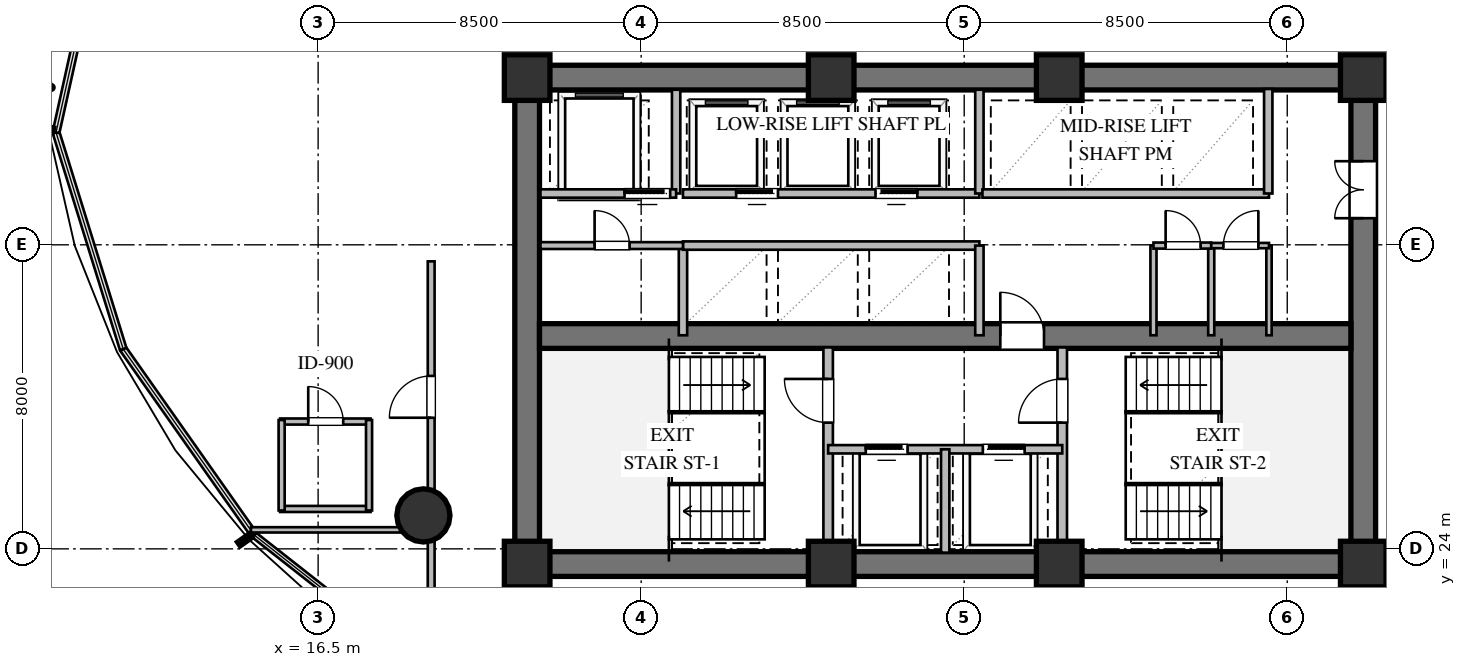
"""IFC4 building model, lengths in metres.
Left out: names, types, materials, properties, quantities, classifications, styles, units other than length and angle.
Written with IfcOpenShell. Run it as: python <this file> out.ifc"""

import sys

from ifc_helpers import new_model, si_unit, direction, frame, frame_2d, origin, origin_2d, place, context, subcontext, project, spatial, rectangle, circle, extrude, element, fill, save


model = new_model("IFC4")
c1 = context("Model", 3, precision=1e-05, world=origin(), true_north=direction((0.0, 1.0)))
c2 = subcontext(c1, "Body", "Model", "MODEL_VIEW")
j1 = project(units=[si_unit("LENGTHUNIT", "METRE"), si_unit("PLANEANGLEUNIT", "RADIAN")], contexts=[c1])
p1 = place(None, origin())
s1 = spatial("IfcSite", under=j1, at=p1, CompositionType="ELEMENT")
p2 = place(p1, origin())
s2 = spatial("IfcBuilding", under=s1, at=p2, CompositionType="ELEMENT")
p3 = place(p2, frame((0.0, 0.0, 52.8)))
s3 = spatial("IfcBuildingStorey", under=s2, at=p3, CompositionType="ELEMENT", Elevation=52.8)
for number, where, z_axis, x_axis in (
    (1, (21.675, 23.6, 0.0), (0.0, 0.0, 1.0), (1.0, 0.0, 0.0)),
    (2, (21.675, 36.4, 0.0), (0.0, 0.0, 1.0), (1.0, 0.0, 0.0)),
):
    element("IfcWall", number, at=place(p3, frame(where, z_axis=z_axis, x_axis=x_axis)), inside=s3, PredefinedType="SHEAR", context=c2, shape_type="SweptSolid", body=[
        extrude(rectangle(XDim=22.65, YDim=0.65, at=frame_2d((11.325, 0.0))), origin(), (0.0, 0.0, 1.0), 3.36),
    ])
p4 = place(p3, frame((22.0, 23.925, 0.0), z_axis=(0.0, 0.0, 1.0), x_axis=(0.0, 1.0, 0.0)))
e3 = element("IfcWall", 3, at=p4, inside=s3, PredefinedType="SHEAR", context=c2, shape_type="SweptSolid", body=[
    extrude(rectangle(XDim=12.15, YDim=0.65, at=frame_2d((6.075, 0.0))), origin(), (0.0, 0.0, 1.0), 3.36),
])
p5 = place(p3, frame((44.0, 23.925, 0.0), z_axis=(0.0, 0.0, 1.0), x_axis=(0.0, 1.0, 0.0)))
e4 = element("IfcWall", 4, at=p5, inside=s3, PredefinedType="SHEAR", context=c2, shape_type="SweptSolid", body=[
    extrude(rectangle(XDim=12.15, YDim=0.65, at=frame_2d((6.075, 0.0))), origin(), (0.0, 0.0, 1.0), 3.36),
])
p6 = place(p5, frame((8.775, 0.0, 0.0)))
e5 = element("IfcOpeningElement", 5, at=p6, cuts=e4, PredefinedType="OPENING", context=c2, shape_type="SweptSolid", body=[
    extrude(rectangle(XDim=1.5, YDim=2.15, at=frame_2d((0.75, 1.075))), frame((0.0, 0.335, 0.0), z_axis=(0.0, -1.0, 0.0), x_axis=(1.0, 0.0, 0.0)), (0.0, 0.0, 1.0), 0.67),
])
p7 = place(p3, frame((22.325, 29.6, 0.0), z_axis=(0.0, 0.0, 1.0), x_axis=(1.0, 0.0, 0.0)))
e6 = element("IfcWall", 6, at=p7, inside=s3, PredefinedType="SHEAR", context=c2, shape_type="SweptSolid", body=[
    extrude(rectangle(XDim=21.35, YDim=0.65, at=frame_2d((10.675, 0.0))), origin(), (0.0, 0.0, 1.0), 3.36),
])
p8 = place(p7, frame((12.125, 0.0, 0.0)))
e7 = element("IfcOpeningElement", 7, at=p8, cuts=e6, PredefinedType="OPENING", context=c2, shape_type="SweptSolid", body=[
    extrude(rectangle(XDim=1.15, YDim=2.1, at=frame_2d((0.575, 1.05))), frame((0.0, 0.335, 0.0), z_axis=(0.0, -1.0, 0.0), x_axis=(1.0, 0.0, 0.0)), (0.0, 0.0, 1.0), 0.67),
])
for number, where, z_axis, x_axis in (
    (8, (22.0, 23.6, 0.0), (0.0, 0.0, 1.0), (1.0, 0.0, 0.0)),
    (9, (30.0, 23.6, 0.0), (0.0, 0.0, 1.0), (1.0, 0.0, 0.0)),
    (10, (36.0, 23.6, 0.0), (0.0, 0.0, 1.0), (1.0, 0.0, 0.0)),
    (11, (44.0, 23.6, 0.0), (0.0, 0.0, 1.0), (1.0, 0.0, 0.0)),
    (12, (44.0, 36.4, 0.0), (0.0, 0.0, 1.0), (1.0, 0.0, 0.0)),
    (13, (36.0, 36.4, 0.0), (0.0, 0.0, 1.0), (1.0, 0.0, 0.0)),
    (14, (30.0, 36.4, 0.0), (0.0, 0.0, 1.0), (1.0, 0.0, 0.0)),
    (15, (22.0, 36.4, 0.0), (0.0, 0.0, 1.0), (1.0, 0.0, 0.0)),
):
    element("IfcColumn", number, at=place(p3, frame(where, z_axis=z_axis, x_axis=x_axis)), inside=s3, PredefinedType="COLUMN", context=c2, shape_type="SweptSolid", body=[
        extrude(rectangle(XDim=1.2, YDim=1.2, at=origin_2d()), origin(), (0.0, 0.0, 1.0), 3.6),
    ])
p9 = place(p3, frame((19.27, 24.88, 0.0), z_axis=(0.0, 0.0, 1.0), x_axis=(1.0, 0.0, 0.0)))
e16 = element("IfcColumn", 16, at=p9, inside=s3, PredefinedType="COLUMN", context=c2, shape_type="SweptSolid", body=[
    extrude(circle(Radius=0.7, at=origin_2d()), origin(), (0.0, 0.0, 1.0), 3.6),
])
p10 = place(p3, frame((29.92, 23.9, 0.0), z_axis=(0.0, 0.0, 1.0), x_axis=(0.0, 1.0, 0.0)))
e17 = element("IfcWall", 17, at=p10, inside=s3, PredefinedType="SOLIDWALL", context=c2, shape_type="SweptSolid", body=[
    extrude(rectangle(XDim=5.4, YDim=0.25, at=frame_2d((2.7, 0.0))), origin(), (0.0, 0.0, 1.0), 3.36),
])
p11 = place(p10, frame((3.421, 0.0, 0.0)))
e18 = element("IfcOpeningElement", 18, at=p11, cuts=e17, PredefinedType="OPENING", context=c2, shape_type="SweptSolid", body=[
    extrude(rectangle(XDim=1.15, YDim=2.1, at=frame_2d((0.575, 1.05))), frame((0.0, 0.135, 0.0), z_axis=(0.0, -1.0, 0.0), x_axis=(1.0, 0.0, 0.0)), (0.0, 0.0, 1.0), 0.27),
])
p12 = place(p3, frame((36.08, 23.9, 0.0), z_axis=(0.0, 0.0, 1.0), x_axis=(0.0, 1.0, 0.0)))
e19 = element("IfcWall", 19, at=p12, inside=s3, PredefinedType="SOLIDWALL", context=c2, shape_type="SweptSolid", body=[
    extrude(rectangle(XDim=5.4, YDim=0.25, at=frame_2d((2.7, 0.0))), origin(), (0.0, 0.0, 1.0), 3.36),
])
p13 = place(p12, frame((3.421, 0.0, 0.0)))
e20 = element("IfcOpeningElement", 20, at=p13, cuts=e19, PredefinedType="OPENING", context=c2, shape_type="SweptSolid", body=[
    extrude(rectangle(XDim=1.15, YDim=2.1, at=frame_2d((0.575, 1.05))), frame((0.0, 0.135, 0.0), z_axis=(0.0, -1.0, 0.0), x_axis=(1.0, 0.0, 0.0)), (0.0, 0.0, 1.0), 0.27),
])
p14 = place(p3, frame((29.92, 26.62, 0.0), z_axis=(0.0, 0.0, 1.0), x_axis=(1.0, 0.0, 0.0)))
e21 = element("IfcWall", 21, at=p14, inside=s3, PredefinedType="SOLIDWALL", context=c2, shape_type="SweptSolid", body=[
    extrude(rectangle(XDim=6.16, YDim=0.22, at=frame_2d((3.08, 0.0))), origin(), (0.0, 0.0, 1.0), 3.36),
])
p15 = place(p14, frame((0.99, 0.0, 0.0)))
e22 = element("IfcOpeningElement", 22, at=p15, cuts=e21, PredefinedType="OPENING", context=c2, shape_type="SweptSolid", body=[
    extrude(rectangle(XDim=1.1, YDim=2.1, at=frame_2d((0.55, 1.05))), frame((0.0, 0.12, 0.0), z_axis=(0.0, -1.0, 0.0), x_axis=(1.0, 0.0, 0.0)), (0.0, 0.0, 1.0), 0.24),
])
p16 = place(p14, frame((4.07, 0.0, 0.0)))
e23 = element("IfcOpeningElement", 23, at=p16, cuts=e21, PredefinedType="OPENING", context=c2, shape_type="SweptSolid", body=[
    extrude(rectangle(XDim=1.1, YDim=2.1, at=frame_2d((0.55, 1.05))), frame((0.0, 0.12, 0.0), z_axis=(0.0, -1.0, 0.0), x_axis=(1.0, 0.0, 0.0)), (0.0, 0.0, 1.0), 0.24),
])
p17 = place(p3, frame((33.0, 23.9, 0.0), z_axis=(0.0, 0.0, 1.0), x_axis=(0.0, 1.0, 0.0)))
e24 = element("IfcWall", 24, at=p17, inside=s3, PredefinedType="SOLIDWALL", context=c2, shape_type="SweptSolid", body=[
    extrude(rectangle(XDim=2.72, YDim=0.22, at=frame_2d((1.36, 0.0))), origin(), (0.0, 0.0, 1.0), 3.36),
])
p18 = place(p3, frame((25.92, 33.35, 0.0), z_axis=(0.0, 0.0, 1.0), x_axis=(0.0, 1.0, 0.0)))
e25 = element("IfcWall", 25, at=p18, inside=s3, PredefinedType="SOLIDWALL", context=c2, shape_type="SweptSolid", body=[
    extrude(rectangle(XDim=2.73, YDim=0.22, at=frame_2d((1.365, 0.0))), origin(), (0.0, 0.0, 1.0), 3.36),
])
p19 = place(p3, frame((22.35, 33.35, 0.0), z_axis=(0.0, 0.0, 1.0), x_axis=(1.0, 0.0, 0.0)))
e26 = element("IfcWall", 26, at=p19, inside=s3, PredefinedType="SOLIDWALL", context=c2, shape_type="SweptSolid", body=[
    extrude(rectangle(XDim=3.57, YDim=0.22, at=frame_2d((1.785, 0.0))), origin(), (0.0, 0.0, 1.0), 3.36),
])
p20 = place(p19, frame((2.213, 0.0, 0.0)))
e27 = element("IfcOpeningElement", 27, at=p20, cuts=e26, PredefinedType="OPENING", context=c2, shape_type="SweptSolid", body=[
    extrude(rectangle(XDim=1.2, YDim=2.1, at=frame_2d((0.6, 1.05))), frame((0.0, 0.12, 0.0), z_axis=(0.0, -1.0, 0.0), x_axis=(1.0, 0.0, 0.0)), (0.0, 0.0, 1.0), 0.24),
])
p21 = place(p3, frame((26.1, 29.62, 0.0), z_axis=(0.0, 0.0, 1.0), x_axis=(0.0, 1.0, 0.0)))
e28 = element("IfcWall", 28, at=p21, inside=s3, PredefinedType="SOLIDWALL", context=c2, shape_type="SweptSolid", body=[
    extrude(rectangle(XDim=2.36, YDim=0.22, at=frame_2d((1.18, 0.0))), origin(), (0.0, 0.0, 1.0), 3.36),
])
p22 = place(p3, frame((26.1, 31.98, 0.0), z_axis=(0.0, 0.0, 1.0), x_axis=(1.0, 0.0, 0.0)))
e29 = element("IfcWall", 29, at=p22, inside=s3, PredefinedType="SOLIDWALL", context=c2, shape_type="SweptSolid", body=[
    extrude(rectangle(XDim=7.8, YDim=0.22, at=frame_2d((3.9, 0.0))), origin(), (0.0, 0.0, 1.0), 3.36),
])
p23 = place(p3, frame((33.9, 29.62, 0.0), z_axis=(0.0, 0.0, 1.0), x_axis=(0.0, 1.0, 0.0)))
e30 = element("IfcWall", 30, at=p23, inside=s3, PredefinedType="SOLIDWALL", context=c2, shape_type="SweptSolid", body=[
    extrude(rectangle(XDim=2.36, YDim=0.22, at=frame_2d((1.18, 0.0))), origin(), (0.0, 0.0, 1.0), 3.36),
])
p24 = place(p3, frame((26.1, 33.35, 0.0), z_axis=(0.0, 0.0, 1.0), x_axis=(1.0, 0.0, 0.0)))
e31 = element("IfcWall", 31, at=p24, inside=s3, PredefinedType="SOLIDWALL", context=c2, shape_type="SweptSolid", body=[
    extrude(rectangle(XDim=7.8, YDim=0.22, at=frame_2d((3.9, 0.0))), origin(), (0.0, 0.0, 1.0), 3.36),
])
p25 = place(p24, frame((1.4, 0.0, 0.0)))
e32 = element("IfcOpeningElement", 32, at=p25, cuts=e31, PredefinedType="OPENING", context=c2, shape_type="SweptSolid", body=[
    extrude(rectangle(XDim=1.1, YDim=2.1, at=frame_2d((0.55, 1.05))), frame((0.0, 0.12, 0.0), z_axis=(0.0, -1.0, 0.0), x_axis=(1.0, 0.0, 0.0)), (0.0, 0.0, 1.0), 0.24),
])
p26 = place(p24, frame((5.066, 0.0, 0.0)))
e33 = element("IfcOpeningElement", 33, at=p26, cuts=e31, PredefinedType="OPENING", context=c2, shape_type="SweptSolid", body=[
    extrude(rectangle(XDim=1.1, YDim=2.1, at=frame_2d((0.55, 1.05))), frame((0.0, 0.12, 0.0), z_axis=(0.0, -1.0, 0.0), x_axis=(1.0, 0.0, 0.0)), (0.0, 0.0, 1.0), 0.24),
])
p27 = place(p3, frame((33.9, 33.35, 0.0), z_axis=(0.0, 0.0, 1.0), x_axis=(0.0, 1.0, 0.0)))
e34 = element("IfcWall", 34, at=p27, inside=s3, PredefinedType="SOLIDWALL", context=c2, shape_type="SweptSolid", body=[
    extrude(rectangle(XDim=2.73, YDim=0.22, at=frame_2d((1.365, 0.0))), origin(), (0.0, 0.0, 1.0), 3.36),
])
p28 = place(p3, frame((33.98, 33.35, 0.0), z_axis=(0.0, 0.0, 1.0), x_axis=(1.0, 0.0, 0.0)))
e35 = element("IfcWall", 35, at=p28, inside=s3, PredefinedType="SOLIDWALL", context=c2, shape_type="SweptSolid", body=[
    extrude(rectangle(XDim=7.54, YDim=0.22, at=frame_2d((3.77, 0.0))), origin(), (0.0, 0.0, 1.0), 3.36),
])
p29 = place(p3, frame((41.5, 33.35, 0.0), z_axis=(0.0, 0.0, 1.0), x_axis=(0.0, 1.0, 0.0)))
e36 = element("IfcWall", 36, at=p29, inside=s3, PredefinedType="SOLIDWALL", context=c2, shape_type="SweptSolid", body=[
    extrude(rectangle(XDim=2.75, YDim=0.22, at=frame_2d((1.375, 0.0))), origin(), (0.0, 0.0, 1.0), 3.36),
])
p30 = place(p3, frame((22.35, 31.98, 0.0), z_axis=(0.0, 0.0, 1.0), x_axis=(1.0, 0.0, 0.0)))
e37 = element("IfcWall", 37, at=p30, inside=s3, PredefinedType="PARTITIONING", context=c2, shape_type="SweptSolid", body=[
    extrude(rectangle(XDim=3.75, YDim=0.18, at=frame_2d((1.875, 0.0))), origin(), (0.0, 0.0, 1.0), 3.36),
])
p31 = place(p30, frame((1.425, 0.0, 0.0)))
e38 = element("IfcOpeningElement", 38, at=p31, cuts=e37, PredefinedType="OPENING", context=c2, shape_type="SweptSolid", body=[
    extrude(rectangle(XDim=0.92, YDim=2.1, at=frame_2d((0.46, 1.05))), frame((0.0, 0.1, 0.0), z_axis=(0.0, -1.0, 0.0), x_axis=(1.0, 0.0, 0.0)), (0.0, 0.0, 1.0), 0.2),
])
for number, where, z_axis, x_axis in (
    (39, (38.48, 29.62, 0.0), (0.0, 0.0, 1.0), (0.0, 1.0, 0.0)),
    (40, (40.0, 29.62, 0.0), (0.0, 0.0, 1.0), (0.0, 1.0, 0.0)),
):
    element("IfcWall", number, at=place(p3, frame(where, z_axis=z_axis, x_axis=x_axis)), inside=s3, PredefinedType="PLUMBINGWALL", context=c2, shape_type="SweptSolid", body=[
        extrude(rectangle(XDim=2.36, YDim=0.16, at=frame_2d((1.18, 0.0))), origin(), (0.0, 0.0, 1.0), 3.36),
    ])
p32 = place(p3, frame((41.52, 29.62, 0.0), z_axis=(0.0, 0.0, 1.0), x_axis=(0.0, 1.0, 0.0)))
e41 = element("IfcWall", 41, at=p32, inside=s3, PredefinedType="PARTITIONING", context=c2, shape_type="SweptSolid", body=[
    extrude(rectangle(XDim=2.36, YDim=0.14, at=frame_2d((1.18, 0.0))), origin(), (0.0, 0.0, 1.0), 3.36),
])
p33 = place(p3, frame((38.48, 31.98, 0.0), z_axis=(0.0, 0.0, 1.0), x_axis=(1.0, 0.0, 0.0)))
e42 = element("IfcWall", 42, at=p33, inside=s3, PredefinedType="PLUMBINGWALL", context=c2, shape_type="SweptSolid", body=[
    extrude(rectangle(XDim=1.52, YDim=0.16, at=frame_2d((0.76, 0.0))), origin(), (0.0, 0.0, 1.0), 3.36),
])
p34 = place(p33, frame((0.32, 0.0, 0.0)))
e43 = element("IfcOpeningElement", 43, at=p34, cuts=e42, PredefinedType="OPENING", context=c2, shape_type="SweptSolid", body=[
    extrude(rectangle(XDim=0.92, YDim=2.1, at=frame_2d((0.46, 1.05))), frame((0.0, 0.09, 0.0), z_axis=(0.0, -1.0, 0.0), x_axis=(1.0, 0.0, 0.0)), (0.0, 0.0, 1.0), 0.18),
])
p35 = place(p3, frame((40.0, 31.98, 0.0), z_axis=(0.0, 0.0, 1.0), x_axis=(1.0, 0.0, 0.0)))
e44 = element("IfcWall", 44, at=p35, inside=s3, PredefinedType="PARTITIONING", context=c2, shape_type="SweptSolid", body=[
    extrude(rectangle(XDim=1.52, YDim=0.14, at=frame_2d((0.76, 0.0))), origin(), (0.0, 0.0, 1.0), 3.36),
])
p36 = place(p35, frame((0.32, 0.0, 0.0)))
e45 = element("IfcOpeningElement", 45, at=p36, cuts=e44, PredefinedType="OPENING", context=c2, shape_type="SweptSolid", body=[
    extrude(rectangle(XDim=0.92, YDim=2.1, at=frame_2d((0.46, 1.05))), frame((0.0, 0.08, 0.0), z_axis=(0.0, -1.0, 0.0), x_axis=(1.0, 0.0, 0.0)), (0.0, 0.0, 1.0), 0.16),
])
p37 = place(p3, frame((15.5, 25.05, 0.0), z_axis=(0.0, 0.0, 1.0), x_axis=(1.0, 0.0, 0.0)))
e46 = element("IfcWall", 46, at=p37, inside=s3, PredefinedType="PLUMBINGWALL", context=c2, shape_type="SweptSolid", body=[
    extrude(rectangle(XDim=2.38, YDim=0.16, at=frame_2d((1.19, 0.0))), origin(), (0.0, 0.0, 1.0), 3.36),
])
p38 = place(p3, frame((15.5, 27.35, 0.0), z_axis=(0.0, 0.0, 1.0), x_axis=(1.0, 0.0, 0.0)))
e47 = element("IfcWall", 47, at=p38, inside=s3, PredefinedType="PLUMBINGWALL", context=c2, shape_type="SweptSolid", body=[
    extrude(rectangle(XDim=2.38, YDim=0.16, at=frame_2d((1.19, 0.0))), origin(), (0.0, 0.0, 1.0), 3.36),
])
p39 = place(p38, frame((0.74, 0.0, 0.0)))
e48 = element("IfcOpeningElement", 48, at=p39, cuts=e47, PredefinedType="OPENING", context=c2, shape_type="SweptSolid", body=[
    extrude(rectangle(XDim=0.92, YDim=2.1, at=frame_2d((0.46, 1.05))), frame((0.0, 0.09, 0.0), z_axis=(0.0, -1.0, 0.0), x_axis=(1.0, 0.0, 0.0)), (0.0, 0.0, 1.0), 0.18),
])
for number, where, z_axis, x_axis in (
    (49, (15.54, 25.01, 0.0), (0.0, 0.0, 1.0), (0.0, 1.0, 0.0)),
    (50, (17.84, 25.01, 0.0), (0.0, 0.0, 1.0), (0.0, 1.0, 0.0)),
):
    element("IfcWall", number, at=place(p3, frame(where, z_axis=z_axis, x_axis=x_axis)), inside=s3, PredefinedType="PLUMBINGWALL", context=c2, shape_type="SweptSolid", body=[
        extrude(rectangle(XDim=2.38, YDim=0.16, at=frame_2d((1.19, 0.0))), origin(), (0.0, 0.0, 1.0), 3.36),
    ])
p40 = place(p3, frame((19.475, 20.695, 0.0), z_axis=(0.0, 0.0, 1.0), x_axis=(0.0, 1.0, 0.0)))
e51 = element("IfcWall", 51, at=p40, inside=s3, PredefinedType="PARTITIONING", context=c2, shape_type="SweptSolid", body=[
    extrude(rectangle(XDim=3.87, YDim=0.18, at=frame_2d((1.935, 0.0))), origin(), (0.0, 0.0, 1.0), 2.738),
])
p41 = place(p40, frame((0.985, 0.0, 0.0)))
e52 = element("IfcOpeningElement", 52, at=p41, cuts=e51, PredefinedType="OPENING", context=c2, shape_type="SweptSolid", body=[
    extrude(rectangle(XDim=1.1, YDim=2.1, at=frame_2d((0.55, 1.05))), frame((0.0, 0.1, 0.0), z_axis=(0.0, -1.0, 0.0), x_axis=(1.0, 0.0, 0.0)), (0.0, 0.0, 1.0), 0.2),
])
p42 = place(p3, frame((19.475, 24.435, 0.0), z_axis=(0.0, 0.0, 1.0), x_axis=(0.0, 1.0, 0.0)))
e53 = element("IfcWall", 53, at=p42, inside=s3, PredefinedType="PARTITIONING", context=c2, shape_type="SweptSolid", body=[
    extrude(rectangle(XDim=7.13, YDim=0.18, at=frame_2d((3.565, 0.0))), origin(), (0.0, 0.0, 1.0), 2.738),
])
p43 = place(p42, frame((3.015, 0.0, 0.0)))
e54 = element("IfcOpeningElement", 54, at=p43, cuts=e53, PredefinedType="OPENING", context=c2, shape_type="SweptSolid", body=[
    extrude(rectangle(XDim=1.1, YDim=2.1, at=frame_2d((0.55, 1.05))), frame((0.0, 0.1, 0.0), z_axis=(0.0, -1.0, 0.0), x_axis=(1.0, 0.0, 0.0)), (0.0, 0.0, 1.0), 0.2),
])
p44 = place(p3, frame((14.732, 24.5, 0.0), z_axis=(0.0, 0.0, 1.0), x_axis=(1.0, 0.0, 0.0)))
e55 = element("IfcWall", 55, at=p44, inside=s3, PredefinedType="PARTITIONING", context=c2, shape_type="SweptSolid", body=[
    extrude(rectangle(XDim=4.773, YDim=0.14, at=frame_2d((2.386, 0.0))), origin(), (0.0, 0.0, 1.0), 2.89),
])
p45 = place(p11, origin())
e56 = element("IfcDoor", 56, at=p45, inside=s3, OperationType="SINGLE_SWING_RIGHT", PredefinedType="DOOR", context=c2, shape_type="SweptSolid", body=[
    extrude(rectangle(XDim=1.15, YDim=2.1, at=frame_2d((0.575, 1.05))), frame((0.0, 0.025, 0.0), z_axis=(0.0, -1.0, 0.0), x_axis=(1.0, 0.0, 0.0)), (0.0, 0.0, 1.0), 0.05),
])
fill(e18, e56)
p46 = place(p13, origin())
e57 = element("IfcDoor", 57, at=p46, inside=s3, OperationType="SINGLE_SWING_LEFT", PredefinedType="DOOR", context=c2, shape_type="SweptSolid", body=[
    extrude(rectangle(XDim=1.15, YDim=2.1, at=frame_2d((0.575, 1.05))), frame((0.0, 0.025, 0.0), z_axis=(0.0, -1.0, 0.0), x_axis=(1.0, 0.0, 0.0)), (0.0, 0.0, 1.0), 0.05),
])
fill(e20, e57)
p47 = place(p15, origin())
e58 = element("IfcDoor", 58, at=p47, inside=s3, OperationType="SLIDING_TO_LEFT", PredefinedType="DOOR", context=c2, shape_type="SweptSolid", body=[
    extrude(rectangle(XDim=1.1, YDim=2.1, at=frame_2d((0.55, 1.05))), frame((0.0, 0.025, 0.0), z_axis=(0.0, -1.0, 0.0), x_axis=(1.0, 0.0, 0.0)), (0.0, 0.0, 1.0), 0.05),
])
fill(e22, e58)
p48 = place(p16, origin())
e59 = element("IfcDoor", 59, at=p48, inside=s3, OperationType="SLIDING_TO_RIGHT", PredefinedType="DOOR", context=c2, shape_type="SweptSolid", body=[
    extrude(rectangle(XDim=1.1, YDim=2.1, at=frame_2d((0.55, 1.05))), frame((0.0, 0.025, 0.0), z_axis=(0.0, -1.0, 0.0), x_axis=(1.0, 0.0, 0.0)), (0.0, 0.0, 1.0), 0.05),
])
fill(e23, e59)
p49 = place(p8, origin())
e60 = element("IfcDoor", 60, at=p49, inside=s3, OperationType="SINGLE_SWING_LEFT", PredefinedType="DOOR", context=c2, shape_type="SweptSolid", body=[
    extrude(rectangle(XDim=1.15, YDim=2.1, at=frame_2d((0.575, 1.05))), frame((0.0, 0.025, 0.0), z_axis=(0.0, -1.0, 0.0), x_axis=(1.0, 0.0, 0.0)), (0.0, 0.0, 1.0), 0.05),
])
fill(e7, e60)
p50 = place(p6, origin())
e61 = element("IfcDoor", 61, at=p50, inside=s3, OperationType="DOUBLE_DOOR_SINGLE_SWING", PredefinedType="DOOR", context=c2, shape_type="SweptSolid", body=[
    extrude(rectangle(XDim=1.5, YDim=2.15, at=frame_2d((0.75, 1.075))), frame((0.0, 0.025, 0.0), z_axis=(0.0, -1.0, 0.0), x_axis=(1.0, 0.0, 0.0)), (0.0, 0.0, 1.0), 0.05),
])
fill(e5, e61)
p51 = place(p20, origin())
e62 = element("IfcDoor", 62, at=p51, inside=s3, OperationType="SLIDING_TO_LEFT", PredefinedType="DOOR", context=c2, shape_type="SweptSolid", body=[
    extrude(rectangle(XDim=1.2, YDim=2.1, at=frame_2d((0.6, 1.05))), frame((0.0, 0.025, 0.0), z_axis=(0.0, -1.0, 0.0), x_axis=(1.0, 0.0, 0.0)), (0.0, 0.0, 1.0), 0.05),
])
fill(e27, e62)
p52 = place(p25, origin())
e63 = element("IfcDoor", 63, at=p52, inside=s3, OperationType="SLIDING_TO_LEFT", PredefinedType="DOOR", context=c2, shape_type="SweptSolid", body=[
    extrude(rectangle(XDim=1.1, YDim=2.1, at=frame_2d((0.55, 1.05))), frame((0.0, 0.025, 0.0), z_axis=(0.0, -1.0, 0.0), x_axis=(1.0, 0.0, 0.0)), (0.0, 0.0, 1.0), 0.05),
])
fill(e32, e63)
p53 = place(p26, origin())
e64 = element("IfcDoor", 64, at=p53, inside=s3, OperationType="SLIDING_TO_RIGHT", PredefinedType="DOOR", context=c2, shape_type="SweptSolid", body=[
    extrude(rectangle(XDim=1.1, YDim=2.1, at=frame_2d((0.55, 1.05))), frame((0.0, 0.025, 0.0), z_axis=(0.0, -1.0, 0.0), x_axis=(1.0, 0.0, 0.0)), (0.0, 0.0, 1.0), 0.05),
])
fill(e33, e64)
p54 = place(p31, origin())
e65 = element("IfcDoor", 65, at=p54, inside=s3, OperationType="SINGLE_SWING_LEFT", PredefinedType="DOOR", context=c2, shape_type="SweptSolid", body=[
    extrude(rectangle(XDim=0.92, YDim=2.1, at=frame_2d((0.46, 1.05))), frame((0.0, 0.025, 0.0), z_axis=(0.0, -1.0, 0.0), x_axis=(1.0, 0.0, 0.0)), (0.0, 0.0, 1.0), 0.05),
])
fill(e38, e65)
p55 = place(p34, origin())
e66 = element("IfcDoor", 66, at=p55, inside=s3, OperationType="SINGLE_SWING_LEFT", PredefinedType="DOOR", context=c2, shape_type="SweptSolid", body=[
    extrude(rectangle(XDim=0.92, YDim=2.1, at=frame_2d((0.46, 1.05))), frame((0.0, 0.025, 0.0), z_axis=(0.0, -1.0, 0.0), x_axis=(1.0, 0.0, 0.0)), (0.0, 0.0, 1.0), 0.05),
])
fill(e43, e66)
p56 = place(p36, origin())
e67 = element("IfcDoor", 67, at=p56, inside=s3, OperationType="SINGLE_SWING_RIGHT", PredefinedType="DOOR", context=c2, shape_type="SweptSolid", body=[
    extrude(rectangle(XDim=0.92, YDim=2.1, at=frame_2d((0.46, 1.05))), frame((0.0, 0.025, 0.0), z_axis=(0.0, -1.0, 0.0), x_axis=(1.0, 0.0, 0.0)), (0.0, 0.0, 1.0), 0.05),
])
fill(e45, e67)
p57 = place(p39, origin())
e68 = element("IfcDoor", 68, at=p57, inside=s3, OperationType="SINGLE_SWING_LEFT", PredefinedType="DOOR", context=c2, shape_type="SweptSolid", body=[
    extrude(rectangle(XDim=0.92, YDim=2.1, at=frame_2d((0.46, 1.05))), frame((0.0, 0.025, 0.0), z_axis=(0.0, -1.0, 0.0), x_axis=(1.0, 0.0, 0.0)), (0.0, 0.0, 1.0), 0.05),
])
fill(e48, e68)
p58 = place(p43, origin())
e69 = element("IfcDoor", 69, at=p58, inside=s3, OperationType="SINGLE_SWING_LEFT", PredefinedType="DOOR", context=c2, shape_type="SweptSolid", body=[
    extrude(rectangle(XDim=1.1, YDim=2.1, at=frame_2d((0.55, 1.05))), frame((0.0, 0.025, 0.0), z_axis=(0.0, -1.0, 0.0), x_axis=(1.0, 0.0, 0.0)), (0.0, 0.0, 1.0), 0.05),
])
fill(e54, e69)
save(model, sys.argv[1])
